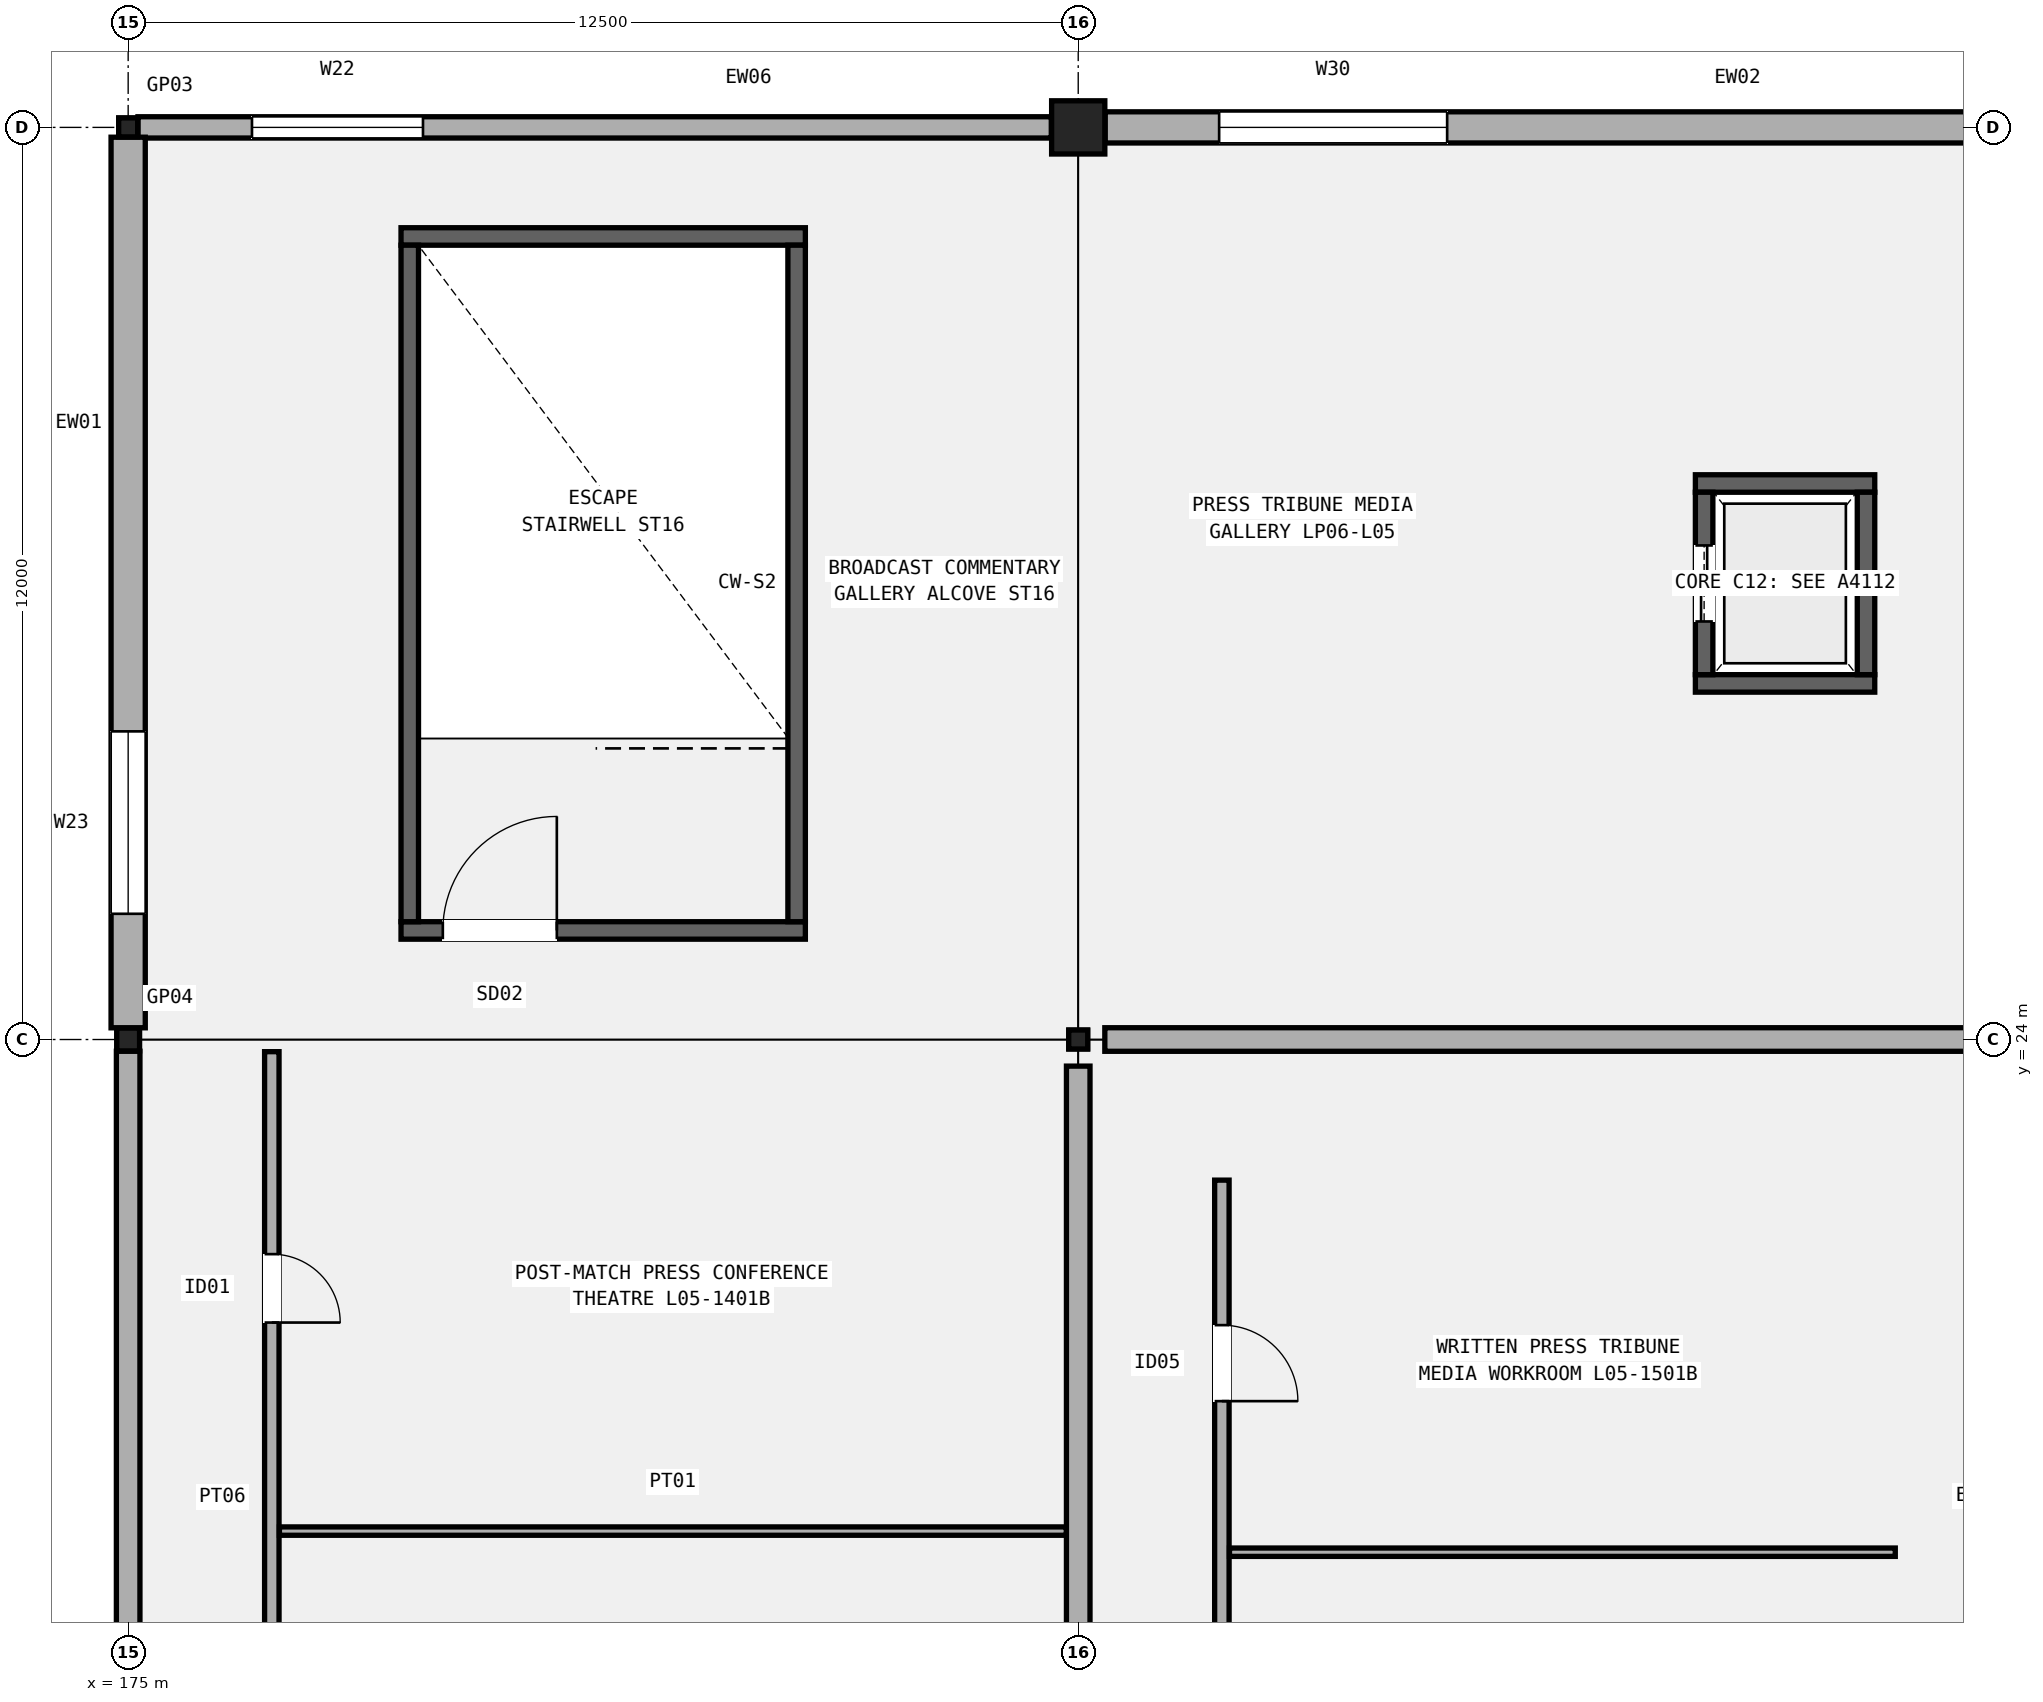
"""IFC4 building model, lengths in metres.
Left out: names, types, materials, properties, quantities, classifications, styles, units other than length and angle.
Written with IfcOpenShell. Run it as: python <this file> out.ifc"""

import sys

from ifc_helpers import new_model, si_unit, direction, frame, frame_2d, origin, origin_2d, place, context, subcontext, project, spatial, rectangle, hollow_rectangle, extrude, element, fill, save


model = new_model("IFC4")
c1 = context("Model", 3, precision=1e-05, world=origin(), true_north=direction((0.0, 1.0)))
c2 = subcontext(c1, "Body", "Model", "MODEL_VIEW")
j1 = project(units=[si_unit("LENGTHUNIT", "METRE"), si_unit("PLANEANGLEUNIT", "RADIAN")], contexts=[c1])
p1 = place(None, origin())
s1 = spatial("IfcSite", under=j1, at=p1, CompositionType="ELEMENT")
p2 = place(p1, origin())
s2 = spatial("IfcBuilding", under=s1, at=p2, CompositionType="ELEMENT")
p3 = place(p2, frame((0.0, 0.0, 25.8)))
s3 = spatial("IfcBuildingStorey", under=s2, at=p3, CompositionType="ELEMENT", Elevation=25.8)
p4 = place(p3, frame((175.0, 24.0, 0.0), z_axis=(0.0, 0.0, 1.0), x_axis=(1.0, 0.0, 0.0)))
e1 = element("IfcColumn", 1, at=p4, inside=s3, PredefinedType="COLUMN", context=c2, shape_type="SweptSolid", body=[
    extrude(hollow_rectangle(XDim=0.3, YDim=0.3, WallThickness=0.012, InnerFilletRadius=0.012, OuterFilletRadius=0.024, at=origin_2d()), origin(), (0.0, 0.0, 1.0), 5.4),
])
for number, where, z_axis, x_axis in (
    (2, (175.0, 36.0, 0.0), (0.0, 0.0, 1.0), (1.0, 0.0, 0.0)),
    (3, (187.5, 24.0, 0.0), (0.0, 0.0, 1.0), (1.0, 0.0, 0.0)),
):
    element("IfcColumn", number, at=place(p3, frame(where, z_axis=z_axis, x_axis=x_axis)), inside=s3, PredefinedType="COLUMN", context=c2, shape_type="SweptSolid", body=[
        extrude(hollow_rectangle(XDim=0.25, YDim=0.25, WallThickness=0.012, InnerFilletRadius=0.012, OuterFilletRadius=0.024, at=origin_2d()), origin(), (0.0, 0.0, 1.0), 5.4),
    ])
p5 = place(p3, frame((187.5, 36.0, 0.0), z_axis=(0.0, 0.0, 1.0), x_axis=(1.0, 0.0, 0.0)))
e4 = element("IfcColumn", 4, at=p5, inside=s3, PredefinedType="COLUMN", context=c2, shape_type="SweptSolid", body=[
    extrude(rectangle(XDim=0.7, YDim=0.7, at=origin_2d()), origin(), (0.0, 0.0, 1.0), 5.4),
])
p6 = place(p3, frame((175.0, 12.179, 0.0), z_axis=(0.0, 0.0, 1.0), x_axis=(0.0, 1.0, 0.0)))
e5 = element("IfcWall", 5, at=p6, inside=s3, PredefinedType="SOLIDWALL", context=c2, shape_type="SweptSolid", body=[
    extrude(rectangle(XDim=11.667, YDim=0.31, at=frame_2d((5.833, 0.0))), origin(), (0.0, 0.0, 1.0), 4.34),
])
p7 = place(p6, frame((1.5, 0.0, 0.95)))
e6 = element("IfcOpeningElement", 6, at=p7, cuts=e5, PredefinedType="OPENING", context=c2, shape_type="SweptSolid", body=[
    extrude(rectangle(XDim=2.25, YDim=1.8, at=frame_2d((1.125, 0.9))), frame((0.0, 0.165, 0.0), z_axis=(0.0, -1.0, 0.0), x_axis=(1.0, 0.0, 0.0)), (0.0, 0.0, 1.0), 0.33),
])
p8 = place(p3, frame((175.129, 36.0, 0.0), z_axis=(0.0, 0.0, 1.0), x_axis=(1.0, 0.0, 0.0)))
e7 = element("IfcWall", 7, at=p8, inside=s3, PredefinedType="SOLIDWALL", context=c2, shape_type="SweptSolid", body=[
    extrude(rectangle(XDim=12.017, YDim=0.28, at=frame_2d((6.009, 0.0))), origin(), (0.0, 0.0, 1.0), 4.452),
])
p9 = place(p8, frame((1.5, 0.0, 0.95)))
e8 = element("IfcOpeningElement", 8, at=p9, cuts=e7, PredefinedType="OPENING", context=c2, shape_type="SweptSolid", body=[
    extrude(rectangle(XDim=2.25, YDim=2.2, at=frame_2d((1.125, 1.1))), frame((0.0, 0.15, 0.0), z_axis=(0.0, -1.0, 0.0), x_axis=(1.0, 0.0, 0.0)), (0.0, 0.0, 1.0), 0.3),
])
p10 = place(p3, frame((175.0, 24.154, 0.0), z_axis=(0.0, 0.0, 1.0), x_axis=(0.0, 1.0, 0.0)))
e9 = element("IfcWall", 9, at=p10, inside=s3, PredefinedType="SOLIDWALL", context=c2, shape_type="SweptSolid", body=[
    extrude(rectangle(XDim=11.717, YDim=0.45, at=frame_2d((5.858, 0.0))), origin(), (0.0, 0.0, 1.0), 4.44),
])
p11 = place(p10, frame((1.5, 0.0, 0.95)))
e10 = element("IfcOpeningElement", 10, at=p11, cuts=e9, PredefinedType="OPENING", context=c2, shape_type="SweptSolid", body=[
    extrude(rectangle(XDim=2.4, YDim=1.65, at=frame_2d((1.2, 0.825))), frame((0.0, 0.235, 0.0), z_axis=(0.0, -1.0, 0.0), x_axis=(1.0, 0.0, 0.0)), (0.0, 0.0, 1.0), 0.47),
])
p12 = place(p3, frame((187.854, 36.0, 0.0), z_axis=(0.0, 0.0, 1.0), x_axis=(1.0, 0.0, 0.0)))
e11 = element("IfcWall", 11, at=p12, inside=s3, PredefinedType="SOLIDWALL", context=c2, shape_type="SweptSolid", body=[
    extrude(rectangle(XDim=11.842, YDim=0.41, at=frame_2d((5.921, 0.0))), origin(), (0.0, 0.0, 1.0), 4.34),
])
p13 = place(p12, frame((1.5, 0.0, 0.95)))
e12 = element("IfcOpeningElement", 12, at=p13, cuts=e11, PredefinedType="OPENING", context=c2, shape_type="SweptSolid", body=[
    extrude(rectangle(XDim=3.0, YDim=1.7, at=frame_2d((1.5, 0.85))), frame((0.0, 0.215, 0.0), z_axis=(0.0, -1.0, 0.0), x_axis=(1.0, 0.0, 0.0)), (0.0, 0.0, 1.0), 0.43),
])
p14 = place(p3, frame((187.85, 24.0, 5.4), z_axis=(0.0, 0.0, 1.0), x_axis=(1.0, 0.0, 0.0)))
e13 = element("IfcWall", 13, at=p14, inside=s3, PredefinedType="SOLIDWALL", context=c2, shape_type="SweptSolid", body=[
    extrude(rectangle(XDim=11.8, YDim=0.31, at=frame_2d((5.9, 0.0))), origin(), (0.0, 0.0, 1.0), 0.58),
])
p15 = place(p3, frame((187.5, 12.35, 5.4), z_axis=(0.0, 0.0, 1.0), x_axis=(0.0, 1.0, 0.0)))
e14 = element("IfcWall", 14, at=p15, inside=s3, PredefinedType="SOLIDWALL", context=c2, shape_type="SweptSolid", body=[
    extrude(rectangle(XDim=11.3, YDim=0.31, at=frame_2d((5.65, 0.0))), origin(), (0.0, 0.0, 1.0), 0.58),
])
p16 = place(p3, frame((178.59, 25.435, 0.0), z_axis=(0.0, 0.0, 1.0), x_axis=(1.0, 0.0, 0.0)))
e15 = element("IfcWall", 15, at=p16, inside=s3, PredefinedType="SHEAR", context=c2, shape_type="SweptSolid", body=[
    extrude(rectangle(XDim=5.32, YDim=0.23, at=frame_2d((2.66, 0.0))), origin(), (0.0, 0.0, 1.0), 5.04),
])
p17 = place(p16, frame((0.55, 0.0, 0.0)))
e16 = element("IfcOpeningElement", 16, at=p17, cuts=e15, PredefinedType="OPENING", context=c2, shape_type="SweptSolid", body=[
    extrude(rectangle(XDim=1.5, YDim=2.2, at=frame_2d((0.75, 1.1))), frame((0.0, 0.125, 0.0), z_axis=(0.0, -1.0, 0.0), x_axis=(1.0, 0.0, 0.0)), (0.0, 0.0, 1.0), 0.25),
])
p18 = place(p3, frame((178.59, 34.565, 0.0), z_axis=(0.0, 0.0, 1.0), x_axis=(1.0, 0.0, 0.0)))
e17 = element("IfcWall", 17, at=p18, inside=s3, PredefinedType="SHEAR", context=c2, shape_type="SweptSolid", body=[
    extrude(rectangle(XDim=5.32, YDim=0.23, at=frame_2d((2.66, 0.0))), origin(), (0.0, 0.0, 1.0), 5.04),
])
for number, where, z_axis, x_axis in (
    (18, (178.705, 25.55, 0.0), (0.0, 0.0, 1.0), (0.0, 1.0, 0.0)),
    (19, (183.795, 25.55, 0.0), (0.0, 0.0, 1.0), (0.0, 1.0, 0.0)),
):
    element("IfcWall", number, at=place(p3, frame(where, z_axis=z_axis, x_axis=x_axis)), inside=s3, PredefinedType="SHEAR", context=c2, shape_type="SweptSolid", body=[
        extrude(rectangle(XDim=8.9, YDim=0.23, at=frame_2d((4.45, 0.0))), origin(), (0.0, 0.0, 1.0), 5.04),
    ])
for number, where, z_axis, x_axis in (
    (20, (195.62, 28.685, 0.0), (0.0, 0.0, 1.0), (1.0, 0.0, 0.0)),
    (21, (195.62, 31.315, 0.0), (0.0, 0.0, 1.0), (1.0, 0.0, 0.0)),
):
    element("IfcWall", number, at=place(p3, frame(where, z_axis=z_axis, x_axis=x_axis)), inside=s3, PredefinedType="SHEAR", context=c2, shape_type="SweptSolid", body=[
        extrude(rectangle(XDim=2.36, YDim=0.23, at=frame_2d((1.18, 0.0))), origin(), (0.0, 0.0, 1.0), 5.04),
    ])
p19 = place(p3, frame((195.735, 28.8, 0.0), z_axis=(0.0, 0.0, 1.0), x_axis=(0.0, 1.0, 0.0)))
e22 = element("IfcWall", 22, at=p19, inside=s3, PredefinedType="SHEAR", context=c2, shape_type="SweptSolid", body=[
    extrude(rectangle(XDim=2.4, YDim=0.23, at=frame_2d((1.2, 0.0))), origin(), (0.0, 0.0, 1.0), 5.04),
])
p20 = place(p19, frame((0.7, 0.0, 0.0)))
e23 = element("IfcOpeningElement", 23, at=p20, cuts=e22, PredefinedType="OPENING", context=c2, shape_type="SweptSolid", body=[
    extrude(rectangle(XDim=1.0, YDim=2.15, at=frame_2d((0.5, 1.075))), frame((0.0, 0.125, 0.0), z_axis=(0.0, -1.0, 0.0), x_axis=(1.0, 0.0, 0.0)), (0.0, 0.0, 1.0), 0.25),
])
p21 = place(p3, frame((197.865, 28.8, 0.0), z_axis=(0.0, 0.0, 1.0), x_axis=(0.0, 1.0, 0.0)))
e24 = element("IfcWall", 24, at=p21, inside=s3, PredefinedType="SHEAR", context=c2, shape_type="SweptSolid", body=[
    extrude(rectangle(XDim=2.4, YDim=0.23, at=frame_2d((1.2, 0.0))), origin(), (0.0, 0.0, 1.0), 5.04),
])
p22 = place(p3, frame((176.89, 12.172, 0.0), z_axis=(0.0, 0.0, 1.0), x_axis=(0.0, 1.0, 0.0)))
e25 = element("IfcWall", 25, at=p22, inside=s3, PredefinedType="PARTITIONING", context=c2, shape_type="SweptSolid", body=[
    extrude(rectangle(XDim=11.668, YDim=0.19, at=frame_2d((5.834, 0.0))), origin(), (0.0, 0.0, 1.0), 4.35),
])
p23 = place(p22, frame((3.514, 0.0, 0.0), z_axis=(0.0, 0.0, 1.0), x_axis=(-1.0, 0.0, 0.0)))
e26 = element("IfcOpeningElement", 26, at=p23, cuts=e25, PredefinedType="OPENING", context=c2, shape_type="SweptSolid", body=[
    extrude(rectangle(XDim=1.76, YDim=2.3, at=frame_2d((0.88, 1.15))), frame((0.0, 0.105, 0.0), z_axis=(0.0, -1.0, 0.0), x_axis=(1.0, 0.0, 0.0)), (0.0, 0.0, 1.0), 0.21),
])
p24 = place(p22, frame((9.004, 0.0, 0.0), z_axis=(0.0, 0.0, 1.0), x_axis=(-1.0, 0.0, 0.0)))
e27 = element("IfcOpeningElement", 27, at=p24, cuts=e25, PredefinedType="OPENING", context=c2, shape_type="SweptSolid", body=[
    extrude(rectangle(XDim=0.9, YDim=2.06, at=frame_2d((0.45, 1.03))), frame((0.0, 0.105, 0.0), z_axis=(0.0, -1.0, 0.0), x_axis=(1.0, 0.0, 0.0)), (0.0, 0.0, 1.0), 0.21),
])
p25 = place(p3, frame((176.99, 17.533, 0.0), z_axis=(0.0, 0.0, 1.0), x_axis=(1.0, 0.0, 0.0)))
e28 = element("IfcWall", 28, at=p25, inside=s3, PredefinedType="PARTITIONING", context=c2, shape_type="SweptSolid", body=[
    extrude(rectangle(XDim=10.353, YDim=0.11, at=frame_2d((5.177, 0.0))), origin(), (0.0, 0.0, 1.0), 4.35),
])
p26 = place(p3, frame((189.39, 12.157, 0.0), z_axis=(0.0, 0.0, 1.0), x_axis=(0.0, 1.0, 0.0)))
e29 = element("IfcWall", 29, at=p26, inside=s3, PredefinedType="PARTITIONING", context=c2, shape_type="SweptSolid", body=[
    extrude(rectangle(XDim=9.993, YDim=0.19, at=frame_2d((4.997, 0.0))), origin(), (0.0, 0.0, 1.0), 4.35),
])
p27 = place(p26, frame((3.0, 0.0, 0.0), z_axis=(0.0, 0.0, 1.0), x_axis=(-1.0, 0.0, 0.0)))
e30 = element("IfcOpeningElement", 30, at=p27, cuts=e29, PredefinedType="OPENING", context=c2, shape_type="SweptSolid", body=[
    extrude(rectangle(XDim=0.98, YDim=2.1, at=frame_2d((0.49, 1.05))), frame((0.0, 0.105, 0.0), z_axis=(0.0, -1.0, 0.0), x_axis=(1.0, 0.0, 0.0)), (0.0, 0.0, 1.0), 0.21),
])
p28 = place(p26, frame((8.085, 0.0, 0.0), z_axis=(0.0, 0.0, 1.0), x_axis=(-1.0, 0.0, 0.0)))
e31 = element("IfcOpeningElement", 31, at=p28, cuts=e29, PredefinedType="OPENING", context=c2, shape_type="SweptSolid", body=[
    extrude(rectangle(XDim=1.0, YDim=2.14, at=frame_2d((0.5, 1.07))), frame((0.0, 0.105, 0.0), z_axis=(0.0, -1.0, 0.0), x_axis=(1.0, 0.0, 0.0)), (0.0, 0.0, 1.0), 0.21),
])
p29 = place(p3, frame((189.49, 17.255, 0.0), z_axis=(0.0, 0.0, 1.0), x_axis=(1.0, 0.0, 0.0)))
e32 = element("IfcWall", 32, at=p29, inside=s3, PredefinedType="PARTITIONING", context=c2, shape_type="SweptSolid", body=[
    extrude(rectangle(XDim=8.76, YDim=0.11, at=frame_2d((4.38, 0.0))), origin(), (0.0, 0.0, 1.0), 4.35),
])
p30 = place(p9, origin())
e33 = element("IfcWindow", 33, at=p30, inside=s3, PartitioningType="SINGLE_PANEL", PredefinedType="WINDOW", context=c2, shape_type="SweptSolid", body=[
    extrude(rectangle(XDim=2.25, YDim=2.2, at=frame_2d((1.125, 1.1))), frame((0.0, 0.03, 0.0), z_axis=(0.0, -1.0, 0.0), x_axis=(1.0, 0.0, 0.0)), (0.0, 0.0, 1.0), 0.06),
])
fill(e8, e33)
p31 = place(p11, origin())
e34 = element("IfcWindow", 34, at=p31, inside=s3, PartitioningType="SINGLE_PANEL", PredefinedType="WINDOW", context=c2, shape_type="SweptSolid", body=[
    extrude(rectangle(XDim=2.4, YDim=1.65, at=frame_2d((1.2, 0.825))), frame((0.0, 0.03, 0.0), z_axis=(0.0, -1.0, 0.0), x_axis=(1.0, 0.0, 0.0)), (0.0, 0.0, 1.0), 0.06),
])
fill(e10, e34)
p32 = place(p13, origin())
e35 = element("IfcWindow", 35, at=p32, inside=s3, PartitioningType="SINGLE_PANEL", PredefinedType="WINDOW", context=c2, shape_type="SweptSolid", body=[
    extrude(rectangle(XDim=3.0, YDim=1.7, at=frame_2d((1.5, 0.85))), frame((0.0, 0.03, 0.0), z_axis=(0.0, -1.0, 0.0), x_axis=(1.0, 0.0, 0.0)), (0.0, 0.0, 1.0), 0.06),
])
fill(e12, e35)
p33 = place(p17, origin())
e36 = element("IfcDoor", 36, at=p33, inside=s3, OperationType="SINGLE_SWING_RIGHT", PredefinedType="DOOR", context=c2, shape_type="SweptSolid", body=[
    extrude(rectangle(XDim=1.5, YDim=2.2, at=frame_2d((0.75, 1.1))), frame((0.0, 0.025, 0.0), z_axis=(0.0, -1.0, 0.0), x_axis=(1.0, 0.0, 0.0)), (0.0, 0.0, 1.0), 0.05),
])
fill(e16, e36)
p34 = place(p20, origin())
e37 = element("IfcDoor", 37, at=p34, inside=s3, OperationType="DOUBLE_DOOR_SLIDING", PredefinedType="DOOR", context=c2, shape_type="SweptSolid", body=[
    extrude(rectangle(XDim=1.0, YDim=2.15, at=frame_2d((0.5, 1.075))), frame((0.0, 0.025, 0.0), z_axis=(0.0, -1.0, 0.0), x_axis=(1.0, 0.0, 0.0)), (0.0, 0.0, 1.0), 0.05),
])
fill(e23, e37)
p35 = place(p24, origin())
e38 = element("IfcDoor", 38, at=p35, inside=s3, OperationType="SINGLE_SWING_RIGHT", PredefinedType="DOOR", context=c2, shape_type="SweptSolid", body=[
    extrude(rectangle(XDim=0.9, YDim=2.06, at=frame_2d((0.45, 1.03))), frame((0.0, 0.025, 0.0), z_axis=(0.0, -1.0, 0.0), x_axis=(1.0, 0.0, 0.0)), (0.0, 0.0, 1.0), 0.05),
])
fill(e27, e38)
p36 = place(p28, origin())
e39 = element("IfcDoor", 39, at=p36, inside=s3, OperationType="SINGLE_SWING_RIGHT", PredefinedType="DOOR", context=c2, shape_type="SweptSolid", body=[
    extrude(rectangle(XDim=1.0, YDim=2.14, at=frame_2d((0.5, 1.07))), frame((0.0, 0.025, 0.0), z_axis=(0.0, -1.0, 0.0), x_axis=(1.0, 0.0, 0.0)), (0.0, 0.0, 1.0), 0.05),
])
fill(e31, e39)
save(model, sys.argv[1])
